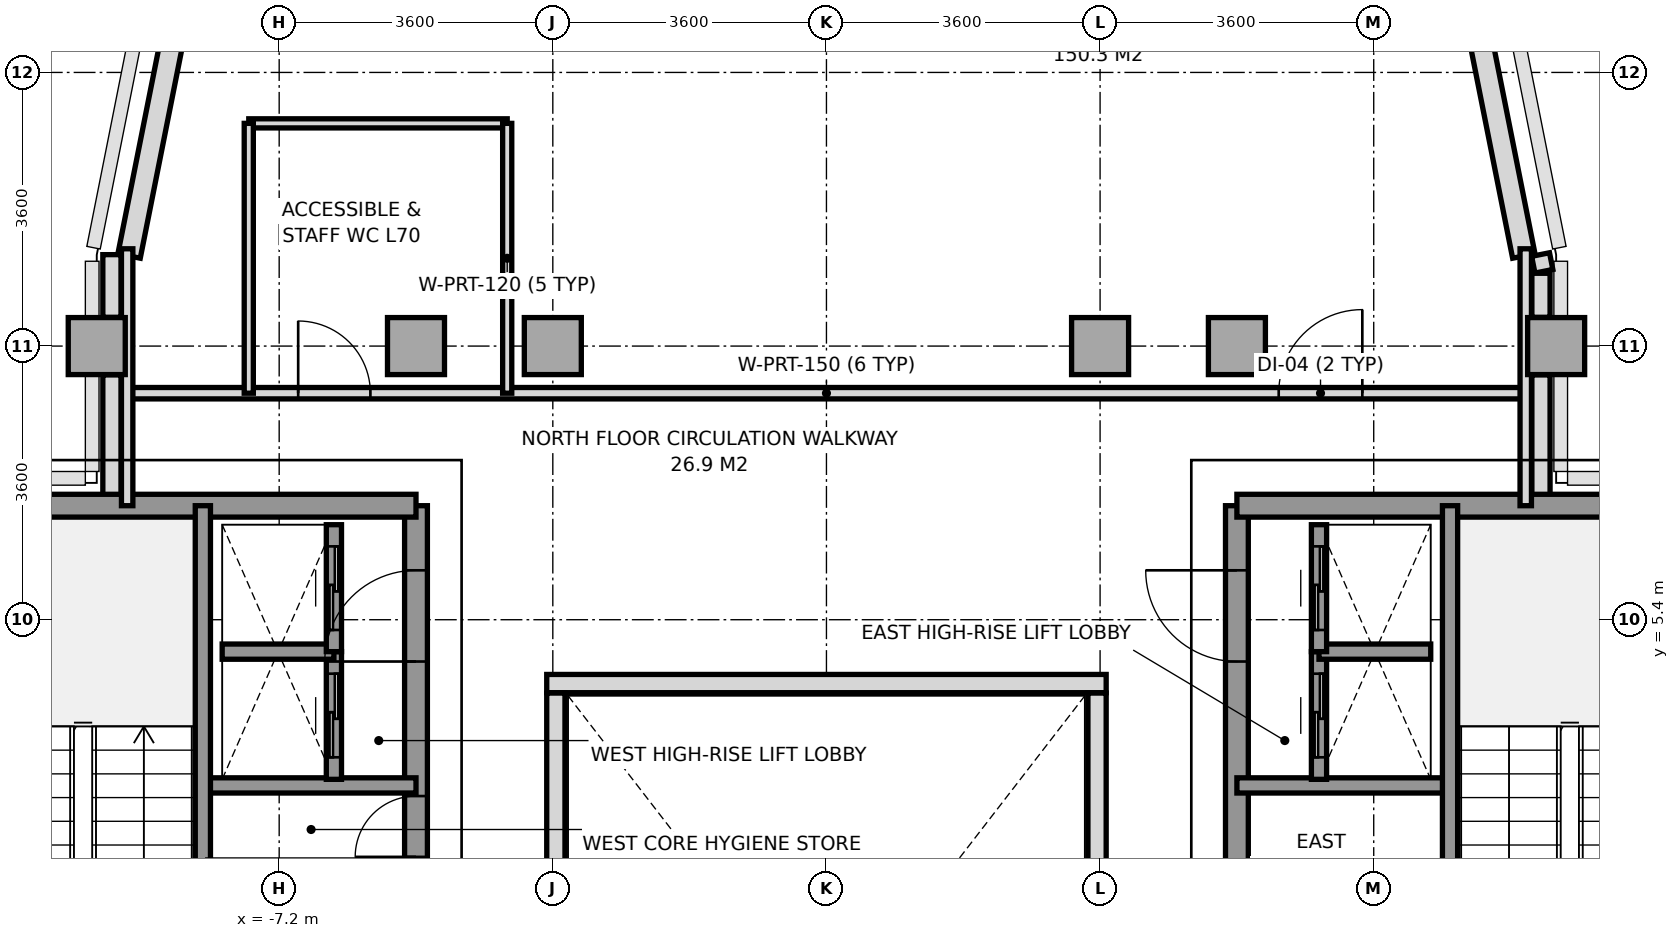
"""IFC4 building model, lengths in metres.
Left out: names, types, materials, properties, quantities, classifications, styles, units other than length and angle.
Written with IfcOpenShell. Run it as: python <this file> out.ifc"""

import sys

from ifc_helpers import new_model, si_unit, direction, frame, frame_2d, origin, origin_2d, place, context, subcontext, project, spatial, rectangle, extrude, source, transform, mapped, element, fill, save


model = new_model("IFC4")
c1 = context("Model", 3, precision=1e-05, world=origin(), true_north=direction((0.0, 1.0)))
c2 = subcontext(c1, "Body", "Model", "MODEL_VIEW")
j1 = project(units=[si_unit("LENGTHUNIT", "METRE"), si_unit("PLANEANGLEUNIT", "RADIAN")], contexts=[c1])
p1 = place(None, origin())
s1 = spatial("IfcSite", under=j1, at=p1, CompositionType="ELEMENT")
p2 = place(p1, origin())
s2 = spatial("IfcBuilding", under=s1, at=p2, CompositionType="ELEMENT")
p3 = place(p2, frame((0.0, 0.0, 252.4)))
s3 = spatial("IfcBuildingStorey", under=s2, at=p3, CompositionType="ELEMENT", Elevation=252.4)
m1 = source(origin(), c2, "Body", "SweptSolid", [
    extrude(rectangle(XDim=0.75, YDim=0.75, at=origin_2d()), origin(), (0.0, 0.0, 1.0), 3.01),
])
for number, where, z_axis, x_axis in (
    (1, (-9.6, 9.0, 0.0), (0.0, 0.0, 1.0), (1.0, 0.0, 0.0)),
    (2, (-5.4, 9.0, 0.0), (0.0, 0.0, 1.0), (1.0, 0.0, 0.0)),
    (3, (-3.6, 9.0, 0.0), (0.0, 0.0, 1.0), (1.0, 0.0, 0.0)),
    (4, (3.6, 9.0, 0.0), (0.0, 0.0, 1.0), (1.0, 0.0, 0.0)),
    (5, (5.4, 9.0, 0.0), (0.0, 0.0, 1.0), (1.0, 0.0, 0.0)),
    (6, (9.6, 9.0, 0.0), (0.0, 0.0, 1.0), (1.0, 0.0, 0.0)),
):
    element("IfcColumn", number, at=place(p3, frame(where, z_axis=z_axis, x_axis=x_axis)), inside=s3, PredefinedType="COLUMN", context=c2, shape_type="MappedRepresentation", body=[
        mapped(m1, transform((0.0, 0.0, 0.0), x_axis=(1.0, 0.0, 0.0), y_axis=(0.0, 1.0, 0.0), z_axis=(0.0, 0.0, 1.0), scale=1.0)),
    ])
for number, where, z_axis, x_axis in (
    (7, (9.175, 10.185, 0.0), (0.0, 0.0, 1.0), (-0.195, 0.981, 0.0)),
    (8, (-8.471, 13.725, 0.0), (0.0, 0.0, 1.0), (-0.195, -0.981, 0.0)),
):
    element("IfcWall", number, at=place(p3, frame(where, z_axis=z_axis, x_axis=x_axis)), inside=s3, PredefinedType="SOLIDWALL", context=c2, shape_type="SweptSolid", body=[
        extrude(rectangle(XDim=3.609, YDim=0.3, at=frame_2d((1.804, 0.0))), origin(), (0.0, 0.0, 1.0), 3.01),
    ])
p4 = place(p3, frame((-9.4, 6.953, 0.0), z_axis=(0.0, 0.0, 1.0), x_axis=(0.0, 1.0, 0.0)))
e9 = element("IfcWall", 9, at=p4, inside=s3, PredefinedType="PARAPET", context=c2, shape_type="SweptSolid", body=[
    extrude(rectangle(XDim=1.669, YDim=0.24, at=frame_2d((0.834, 0.0))), origin(), (0.0, 0.0, 1.0), 1.15),
])
p5 = place(p3, frame((-9.4, 9.378, 0.0), z_axis=(0.0, 0.0, 1.0), x_axis=(0.0, 1.0, 0.0)))
e10 = element("IfcWall", 10, at=p5, inside=s3, PredefinedType="PARAPET", context=c2, shape_type="SweptSolid", body=[
    extrude(rectangle(XDim=0.825, YDim=0.24, at=frame_2d((0.413, 0.0))), origin(), (0.0, 0.0, 1.0), 1.15),
])
p6 = place(p3, frame((9.395, 10.204, 0.0), z_axis=(0.0, 0.0, 1.0), x_axis=(0.194859894132, -0.980831087221, 0.0)))
e11 = element("IfcWall", 11, at=p6, inside=s3, PredefinedType="PARAPET", context=c2, shape_type="SweptSolid", body=[
    extrude(rectangle(XDim=0.224, YDim=0.24, at=frame_2d((0.112, 0.0))), origin(), (0.0, 0.0, 1.0), 1.15),
])
p7 = place(p3, frame((9.4, 9.958, 0.0), z_axis=(0.0, 0.0, 1.0), x_axis=(0.0, -1.0, 0.0)))
e12 = element("IfcWall", 12, at=p7, inside=s3, PredefinedType="PARAPET", context=c2, shape_type="SweptSolid", body=[
    extrude(rectangle(XDim=0.58, YDim=0.24, at=frame_2d((0.29, 0.0))), origin(), (0.0, 0.0, 1.0), 1.15),
])
p8 = place(p3, frame((9.4, 8.622, 0.0), z_axis=(0.0, 0.0, 1.0), x_axis=(0.0, -1.0, 0.0)))
e13 = element("IfcWall", 13, at=p8, inside=s3, PredefinedType="PARAPET", context=c2, shape_type="SweptSolid", body=[
    extrude(rectangle(XDim=1.669, YDim=0.24, at=frame_2d((0.834, 0.0))), origin(), (0.0, 0.0, 1.0), 1.15),
])
p9 = place(p3, frame((-5.4, -5.6, 0.0), z_axis=(0.0, 0.0, 1.0), x_axis=(0.0, 1.0, 0.0)))
e14 = element("IfcWall", 14, at=p9, inside=s3, PredefinedType="SHEAR", context=c2, shape_type="SweptSolid", body=[
    extrude(rectangle(XDim=12.5, YDim=0.3, at=frame_2d((6.25, 0.0))), origin(), (0.0, 0.0, 1.0), 3.01),
])
p10 = place(p9, frame((4.55, 0.0, 0.0)))
e15 = element("IfcOpeningElement", 15, at=p10, cuts=e14, PredefinedType="OPENING", context=c2, shape_type="SweptSolid", body=[
    extrude(rectangle(XDim=1.2, YDim=2.2, at=frame_2d((0.6, 1.1))), frame((0.0, 0.16, 0.0), z_axis=(0.0, -1.0, 0.0), x_axis=(1.0, 0.0, 0.0)), (0.0, 0.0, 1.0), 0.32),
])
p11 = place(p9, frame((10.45, 0.0, 0.0)))
e16 = element("IfcOpeningElement", 16, at=p11, cuts=e14, PredefinedType="OPENING", context=c2, shape_type="SweptSolid", body=[
    extrude(rectangle(XDim=1.2, YDim=2.2, at=frame_2d((0.6, 1.1))), frame((0.0, 0.16, 0.0), z_axis=(0.0, -1.0, 0.0), x_axis=(1.0, 0.0, 0.0)), (0.0, 0.0, 1.0), 0.32),
])
p12 = place(p9, frame((6.86, 0.0, 0.0)))
e17 = element("IfcOpeningElement", 17, at=p12, cuts=e14, PredefinedType="OPENING", context=c2, shape_type="SweptSolid", body=[
    extrude(rectangle(XDim=0.8, YDim=2.1, at=frame_2d((0.4, 1.05))), frame((0.0, 0.16, 0.0), z_axis=(0.0, -1.0, 0.0), x_axis=(1.0, 0.0, 0.0)), (0.0, 0.0, 1.0), 0.32),
])
p13 = place(p9, frame((7.88, 0.0, 0.0)))
e18 = element("IfcOpeningElement", 18, at=p13, cuts=e14, PredefinedType="OPENING", context=c2, shape_type="SweptSolid", body=[
    extrude(rectangle(XDim=0.8, YDim=2.1, at=frame_2d((0.4, 1.05))), frame((0.0, 0.16, 0.0), z_axis=(0.0, -1.0, 0.0), x_axis=(1.0, 0.0, 0.0)), (0.0, 0.0, 1.0), 0.32),
])
p14 = place(p3, frame((-11.356, 6.9, 0.0), z_axis=(0.0, 0.0, 1.0), x_axis=(1.0, 0.0, 0.0)))
e19 = element("IfcWall", 19, at=p14, inside=s3, PredefinedType="SHEAR", context=c2, shape_type="SweptSolid", body=[
    extrude(rectangle(XDim=5.956, YDim=0.3, at=frame_2d((2.978, 0.0))), origin(), (0.0, 0.0, 1.0), 3.01),
])
p15 = place(p3, frame((-8.18, 3.22, 0.0), z_axis=(0.0, 0.0, 1.0), x_axis=(1.0, 0.0, 0.0)))
e20 = element("IfcWall", 20, at=p15, inside=s3, PredefinedType="SOLIDWALL", context=c2, shape_type="SweptSolid", body=[
    extrude(rectangle(XDim=2.78, YDim=0.2, at=frame_2d((1.39, 0.0))), origin(), (0.0, 0.0, 1.0), 3.01),
])
p16 = place(p3, frame((-8.204, -0.016, 0.0), z_axis=(0.0, 0.0, 1.0), x_axis=(0.0, 1.0, 0.0)))
e21 = element("IfcWall", 21, at=p16, inside=s3, PredefinedType="SOLIDWALL", context=c2, shape_type="SweptSolid", body=[
    extrude(rectangle(XDim=6.916, YDim=0.2, at=frame_2d((3.458, 0.0))), origin(), (0.0, 0.0, 1.0), 3.01),
])
p17 = place(p16, frame((0.2, 0.0, 0.0)))
e22 = element("IfcOpeningElement", 22, at=p17, cuts=e21, PredefinedType="OPENING", context=c2, shape_type="SweptSolid", body=[
    extrude(rectangle(XDim=1.2, YDim=2.2, at=frame_2d((0.6, 1.1))), frame((0.0, 0.11, 0.0), z_axis=(0.0, -1.0, 0.0), x_axis=(1.0, 0.0, 0.0)), (0.0, 0.0, 1.0), 0.22),
])
p18 = place(p3, frame((5.4, -5.6, 0.0), z_axis=(0.0, 0.0, 1.0), x_axis=(0.0, 1.0, 0.0)))
e23 = element("IfcWall", 23, at=p18, inside=s3, PredefinedType="SHEAR", context=c2, shape_type="SweptSolid", body=[
    extrude(rectangle(XDim=12.5, YDim=0.3, at=frame_2d((6.25, 0.0))), origin(), (0.0, 0.0, 1.0), 3.01),
])
p19 = place(p18, frame((4.55, 0.0, 0.0)))
e24 = element("IfcOpeningElement", 24, at=p19, cuts=e23, PredefinedType="OPENING", context=c2, shape_type="SweptSolid", body=[
    extrude(rectangle(XDim=1.2, YDim=2.2, at=frame_2d((0.6, 1.1))), frame((0.0, 0.16, 0.0), z_axis=(0.0, -1.0, 0.0), x_axis=(1.0, 0.0, 0.0)), (0.0, 0.0, 1.0), 0.32),
])
p20 = place(p18, frame((10.45, 0.0, 0.0)))
e25 = element("IfcOpeningElement", 25, at=p20, cuts=e23, PredefinedType="OPENING", context=c2, shape_type="SweptSolid", body=[
    extrude(rectangle(XDim=1.2, YDim=2.2, at=frame_2d((0.6, 1.1))), frame((0.0, 0.16, 0.0), z_axis=(0.0, -1.0, 0.0), x_axis=(1.0, 0.0, 0.0)), (0.0, 0.0, 1.0), 0.32),
])
p21 = place(p3, frame((5.4, 6.9, 0.0), z_axis=(0.0, 0.0, 1.0), x_axis=(1.0, 0.0, 0.0)))
e26 = element("IfcWall", 26, at=p21, inside=s3, PredefinedType="SHEAR", context=c2, shape_type="SweptSolid", body=[
    extrude(rectangle(XDim=5.956, YDim=0.3, at=frame_2d((2.978, 0.0))), origin(), (0.0, 0.0, 1.0), 3.01),
])
p22 = place(p3, frame((5.4, 3.22, 0.0), z_axis=(0.0, 0.0, 1.0), x_axis=(1.0, 0.0, 0.0)))
e27 = element("IfcWall", 27, at=p22, inside=s3, PredefinedType="SOLIDWALL", context=c2, shape_type="SweptSolid", body=[
    extrude(rectangle(XDim=2.78, YDim=0.2, at=frame_2d((1.39, 0.0))), origin(), (0.0, 0.0, 1.0), 3.01),
])
p23 = place(p3, frame((8.204, -0.016, 0.0), z_axis=(0.0, 0.0, 1.0), x_axis=(0.0, 1.0, 0.0)))
e28 = element("IfcWall", 28, at=p23, inside=s3, PredefinedType="SOLIDWALL", context=c2, shape_type="SweptSolid", body=[
    extrude(rectangle(XDim=6.916, YDim=0.2, at=frame_2d((3.458, 0.0))), origin(), (0.0, 0.0, 1.0), 3.01),
])
p24 = place(p23, frame((0.2, 0.0, 0.0)))
e29 = element("IfcOpeningElement", 29, at=p24, cuts=e28, PredefinedType="OPENING", context=c2, shape_type="SweptSolid", body=[
    extrude(rectangle(XDim=1.2, YDim=2.2, at=frame_2d((0.6, 1.1))), frame((0.0, 0.11, 0.0), z_axis=(0.0, -1.0, 0.0), x_axis=(1.0, 0.0, 0.0)), (0.0, 0.0, 1.0), 0.22),
])
p25 = place(p3, frame((-6.48, 3.3, 0.0), z_axis=(0.0, 0.0, 1.0), x_axis=(0.0, 1.0, 0.0)))
e30 = element("IfcWall", 30, at=p25, inside=s3, PredefinedType="SOLIDWALL", context=c2, shape_type="SweptSolid", body=[
    extrude(rectangle(XDim=1.68, YDim=0.2, at=frame_2d((0.84, 0.0))), origin(), (0.0, 0.0, 1.0), 3.01),
])
p26 = place(p25, frame((0.29, 0.0, 0.0)))
e31 = element("IfcOpeningElement", 31, at=p26, cuts=e30, PredefinedType="OPENING", context=c2, shape_type="SweptSolid", body=[
    extrude(rectangle(XDim=1.1, YDim=2.2, at=frame_2d((0.55, 1.1))), frame((0.0, 0.11, 0.0), z_axis=(0.0, -1.0, 0.0), x_axis=(1.0, 0.0, 0.0)), (0.0, 0.0, 1.0), 0.22),
])
p27 = place(p3, frame((-7.95, 4.98, 0.0), z_axis=(0.0, 0.0, 1.0), x_axis=(1.0, 0.0, 0.0)))
e32 = element("IfcWall", 32, at=p27, inside=s3, PredefinedType="SOLIDWALL", context=c2, shape_type="SweptSolid", body=[
    extrude(rectangle(XDim=1.47, YDim=0.2, at=frame_2d((0.735, 0.0))), origin(), (0.0, 0.0, 1.0), 3.01),
])
p28 = place(p3, frame((-6.48, 4.98, 0.0), z_axis=(0.0, 0.0, 1.0), x_axis=(0.0, 1.0, 0.0)))
e33 = element("IfcWall", 33, at=p28, inside=s3, PredefinedType="SOLIDWALL", context=c2, shape_type="SweptSolid", body=[
    extrude(rectangle(XDim=1.67, YDim=0.2, at=frame_2d((0.835, 0.0))), origin(), (0.0, 0.0, 1.0), 3.01),
])
p29 = place(p28, frame((0.285, 0.0, 0.0)))
e34 = element("IfcOpeningElement", 34, at=p29, cuts=e33, PredefinedType="OPENING", context=c2, shape_type="SweptSolid", body=[
    extrude(rectangle(XDim=1.1, YDim=2.2, at=frame_2d((0.55, 1.1))), frame((0.0, 0.11, 0.0), z_axis=(0.0, -1.0, 0.0), x_axis=(1.0, 0.0, 0.0)), (0.0, 0.0, 1.0), 0.22),
])
p30 = place(p3, frame((6.48, 3.3, 0.0), z_axis=(0.0, 0.0, 1.0), x_axis=(0.0, 1.0, 0.0)))
e35 = element("IfcWall", 35, at=p30, inside=s3, PredefinedType="SOLIDWALL", context=c2, shape_type="SweptSolid", body=[
    extrude(rectangle(XDim=1.68, YDim=0.2, at=frame_2d((0.84, 0.0))), origin(), (0.0, 0.0, 1.0), 3.01),
])
p31 = place(p30, frame((0.29, 0.0, 0.0)))
e36 = element("IfcOpeningElement", 36, at=p31, cuts=e35, PredefinedType="OPENING", context=c2, shape_type="SweptSolid", body=[
    extrude(rectangle(XDim=1.1, YDim=2.2, at=frame_2d((0.55, 1.1))), frame((0.0, 0.11, 0.0), z_axis=(0.0, -1.0, 0.0), x_axis=(1.0, 0.0, 0.0)), (0.0, 0.0, 1.0), 0.22),
])
p32 = place(p3, frame((6.48, 4.98, 0.0), z_axis=(0.0, 0.0, 1.0), x_axis=(1.0, 0.0, 0.0)))
e37 = element("IfcWall", 37, at=p32, inside=s3, PredefinedType="SOLIDWALL", context=c2, shape_type="SweptSolid", body=[
    extrude(rectangle(XDim=1.47, YDim=0.2, at=frame_2d((0.735, 0.0))), origin(), (0.0, 0.0, 1.0), 3.01),
])
p33 = place(p3, frame((6.48, 4.98, 0.0), z_axis=(0.0, 0.0, 1.0), x_axis=(0.0, 1.0, 0.0)))
e38 = element("IfcWall", 38, at=p33, inside=s3, PredefinedType="SOLIDWALL", context=c2, shape_type="SweptSolid", body=[
    extrude(rectangle(XDim=1.67, YDim=0.2, at=frame_2d((0.835, 0.0))), origin(), (0.0, 0.0, 1.0), 3.01),
])
p34 = place(p33, frame((0.285, 0.0, 0.0)))
e39 = element("IfcOpeningElement", 39, at=p34, cuts=e38, PredefinedType="OPENING", context=c2, shape_type="SweptSolid", body=[
    extrude(rectangle(XDim=1.1, YDim=2.2, at=frame_2d((0.55, 1.1))), frame((0.0, 0.11, 0.0), z_axis=(0.0, -1.0, 0.0), x_axis=(1.0, 0.0, 0.0)), (0.0, 0.0, 1.0), 0.22),
])
p35 = place(p3, frame((-9.2, 8.38, 0.0), z_axis=(0.0, 0.0, 1.0), x_axis=(1.0, 0.0, 0.0)))
e40 = element("IfcWall", 40, at=p35, inside=s3, PredefinedType="PARTITIONING", context=c2, shape_type="SweptSolid", body=[
    extrude(rectangle(XDim=18.4, YDim=0.15, at=frame_2d((9.2, 0.0))), origin(), (0.0, 0.0, 1.0), 2.57),
])
p36 = place(p35, frame((2.25, 0.0, 0.0)))
e41 = element("IfcOpeningElement", 41, at=p36, cuts=e40, PredefinedType="OPENING", context=c2, shape_type="SweptSolid", body=[
    extrude(rectangle(XDim=0.95, YDim=2.15, at=frame_2d((0.475, 1.075))), frame((0.0, 0.085, 0.0), z_axis=(0.0, -1.0, 0.0), x_axis=(1.0, 0.0, 0.0)), (0.0, 0.0, 1.0), 0.17),
])
p37 = place(p35, frame((15.15, 0.0, 0.0)))
e42 = element("IfcOpeningElement", 42, at=p37, cuts=e40, PredefinedType="OPENING", context=c2, shape_type="SweptSolid", body=[
    extrude(rectangle(XDim=1.1, YDim=2.2, at=frame_2d((0.55, 1.1))), frame((0.0, 0.085, 0.0), z_axis=(0.0, -1.0, 0.0), x_axis=(1.0, 0.0, 0.0)), (0.0, 0.0, 1.0), 0.17),
])
for number, where, z_axis, x_axis in (
    (43, (-9.2, 6.9, 0.0), (0.0, 0.0, 1.0), (0.0, 1.0, 0.0)),
    (44, (9.2, 6.9, 0.0), (0.0, 0.0, 1.0), (0.0, 1.0, 0.0)),
):
    element("IfcWall", number, at=place(p3, frame(where, z_axis=z_axis, x_axis=x_axis)), inside=s3, PredefinedType="PARTITIONING", context=c2, shape_type="SweptSolid", body=[
        extrude(rectangle(XDim=3.38, YDim=0.15, at=frame_2d((1.69, 0.0))), origin(), (0.0, 0.0, 1.0), 2.61),
    ])
p38 = place(p3, frame((-7.6, 11.93, 0.0), z_axis=(0.0, 0.0, 1.0), x_axis=(1.0, 0.0, 0.0)))
e45 = element("IfcWall", 45, at=p38, inside=s3, PredefinedType="PARTITIONING", context=c2, shape_type="SweptSolid", body=[
    extrude(rectangle(XDim=3.4, YDim=0.12, at=frame_2d((1.7, 0.0))), origin(), (0.0, 0.0, 1.0), 3.01),
])
for number, where, z_axis, x_axis in (
    (46, (-7.6, 8.38, 0.0), (0.0, 0.0, 1.0), (0.0, 1.0, 0.0)),
    (47, (-4.2, 8.38, 0.0), (0.0, 0.0, 1.0), (0.0, 1.0, 0.0)),
):
    element("IfcWall", number, at=place(p3, frame(where, z_axis=z_axis, x_axis=x_axis)), inside=s3, PredefinedType="PARTITIONING", context=c2, shape_type="SweptSolid", body=[
        extrude(rectangle(XDim=3.55, YDim=0.12, at=frame_2d((1.775, 0.0))), origin(), (0.0, 0.0, 1.0), 2.61),
    ])
p39 = place(p3, frame((-3.68, 4.56, 0.0), z_axis=(0.0, 0.0, 1.0), x_axis=(1.0, 0.0, 0.0)))
e48 = element("IfcWall", 48, at=p39, inside=s3, PredefinedType="PARAPET", context=c2, shape_type="SweptSolid", body=[
    extrude(rectangle(XDim=7.36, YDim=0.24, at=frame_2d((3.68, 0.0))), origin(), (0.0, 0.0, 1.0), 1.15),
])
for number, where, z_axis, x_axis in (
    (49, (-3.56, -4.435, 0.0), (0.0, 0.0, 1.0), (0.0, 1.0, 0.0)),
    (50, (3.56, -4.435, 0.0), (0.0, 0.0, 1.0), (0.0, 1.0, 0.0)),
):
    element("IfcWall", number, at=place(p3, frame(where, z_axis=z_axis, x_axis=x_axis)), inside=s3, PredefinedType="PARAPET", context=c2, shape_type="SweptSolid", body=[
        extrude(rectangle(XDim=8.87, YDim=0.24, at=frame_2d((4.435, 0.0))), origin(), (0.0, 0.0, 1.0), 1.15),
    ])
m2 = source(origin(), c2, "Body", "SweptSolid", [
    extrude(rectangle(XDim=1.2, YDim=2.2, at=frame_2d((0.6, 1.1))), frame((0.0, 0.025, 0.0), z_axis=(0.0, -1.0, 0.0), x_axis=(1.0, 0.0, 0.0)), (0.0, 0.0, 1.0), 0.05),
])
p40 = place(p11, origin())
e51 = element("IfcDoor", 51, at=p40, inside=s3, OperationType="SINGLE_SWING_LEFT", PredefinedType="DOOR", context=c2, shape_type="MappedRepresentation", body=[
    mapped(m2, transform((0.0, 0.0, 0.0), x_axis=(1.0, 0.0, 0.0), y_axis=(0.0, 1.0, 0.0), z_axis=(0.0, 0.0, 1.0), scale=1.0)),
])
fill(e16, e51)
p41 = place(p20, origin())
e52 = element("IfcDoor", 52, at=p41, inside=s3, OperationType="SINGLE_SWING_RIGHT", PredefinedType="DOOR", context=c2, shape_type="MappedRepresentation", body=[
    mapped(m2, transform((0.0, 0.0, 0.0), x_axis=(1.0, 0.0, 0.0), y_axis=(0.0, 1.0, 0.0), z_axis=(0.0, 0.0, 1.0), scale=1.0)),
])
fill(e25, e52)
m3 = source(origin(), c2, "Body", "SweptSolid", [
    extrude(rectangle(XDim=0.8, YDim=2.1, at=frame_2d((0.4, 1.05))), frame((0.0, 0.025, 0.0), z_axis=(0.0, -1.0, 0.0), x_axis=(1.0, 0.0, 0.0)), (0.0, 0.0, 1.0), 0.05),
])
p42 = place(p13, origin())
e53 = element("IfcDoor", 53, at=p42, inside=s3, OperationType="SINGLE_SWING_LEFT", PredefinedType="DOOR", context=c2, shape_type="MappedRepresentation", body=[
    mapped(m3, transform((0.0, 0.0, 0.0), x_axis=(1.0, 0.0, 0.0), y_axis=(0.0, 1.0, 0.0), z_axis=(0.0, 0.0, 1.0), scale=1.0)),
])
fill(e18, e53)
m4 = source(origin(), c2, "Body", "SweptSolid", [
    extrude(rectangle(XDim=1.1, YDim=2.2, at=frame_2d((0.55, 1.1))), frame((0.0, 0.025, 0.0), z_axis=(0.0, -1.0, 0.0), x_axis=(1.0, 0.0, 0.0)), (0.0, 0.0, 1.0), 0.05),
])
p43 = place(p26, origin())
e54 = element("IfcDoor", 54, at=p43, inside=s3, OperationType="SLIDING_TO_LEFT", PredefinedType="DOOR", context=c2, shape_type="MappedRepresentation", body=[
    mapped(m4, transform((0.0, 0.0, 0.0), x_axis=(1.0, 0.0, 0.0), y_axis=(0.0, 1.0, 0.0), z_axis=(0.0, 0.0, 1.0), scale=1.0)),
])
fill(e31, e54)
p44 = place(p29, origin())
e55 = element("IfcDoor", 55, at=p44, inside=s3, OperationType="SLIDING_TO_LEFT", PredefinedType="DOOR", context=c2, shape_type="MappedRepresentation", body=[
    mapped(m4, transform((0.0, 0.0, 0.0), x_axis=(1.0, 0.0, 0.0), y_axis=(0.0, 1.0, 0.0), z_axis=(0.0, 0.0, 1.0), scale=1.0)),
])
fill(e34, e55)
p45 = place(p31, origin())
e56 = element("IfcDoor", 56, at=p45, inside=s3, OperationType="SLIDING_TO_LEFT", PredefinedType="DOOR", context=c2, shape_type="MappedRepresentation", body=[
    mapped(m4, transform((0.0, 0.0, 0.0), x_axis=(1.0, 0.0, 0.0), y_axis=(0.0, 1.0, 0.0), z_axis=(0.0, 0.0, 1.0), scale=1.0)),
])
fill(e36, e56)
p46 = place(p34, origin())
e57 = element("IfcDoor", 57, at=p46, inside=s3, OperationType="SLIDING_TO_LEFT", PredefinedType="DOOR", context=c2, shape_type="MappedRepresentation", body=[
    mapped(m4, transform((0.0, 0.0, 0.0), x_axis=(1.0, 0.0, 0.0), y_axis=(0.0, 1.0, 0.0), z_axis=(0.0, 0.0, 1.0), scale=1.0)),
])
fill(e39, e57)
m5 = source(origin(), c2, "Body", "SweptSolid", [
    extrude(rectangle(XDim=0.95, YDim=2.15, at=frame_2d((0.475, 1.075))), frame((0.0, 0.025, 0.0), z_axis=(0.0, -1.0, 0.0), x_axis=(1.0, 0.0, 0.0)), (0.0, 0.0, 1.0), 0.05),
])
p47 = place(p36, origin())
e58 = element("IfcDoor", 58, at=p47, inside=s3, OperationType="SINGLE_SWING_LEFT", PredefinedType="DOOR", context=c2, shape_type="MappedRepresentation", body=[
    mapped(m5, transform((0.0, 0.0, 0.0), x_axis=(1.0, 0.0, 0.0), y_axis=(0.0, 1.0, 0.0), z_axis=(0.0, 0.0, 1.0), scale=1.0)),
])
fill(e41, e58)
p48 = place(p37, origin())
e59 = element("IfcDoor", 59, at=p48, inside=s3, OperationType="SINGLE_SWING_RIGHT", PredefinedType="DOOR", context=c2, shape_type="MappedRepresentation", body=[
    mapped(m4, transform((0.0, 0.0, 0.0), x_axis=(1.0, 0.0, 0.0), y_axis=(0.0, 1.0, 0.0), z_axis=(0.0, 0.0, 1.0), scale=1.0)),
])
fill(e42, e59)
save(model, sys.argv[1])
